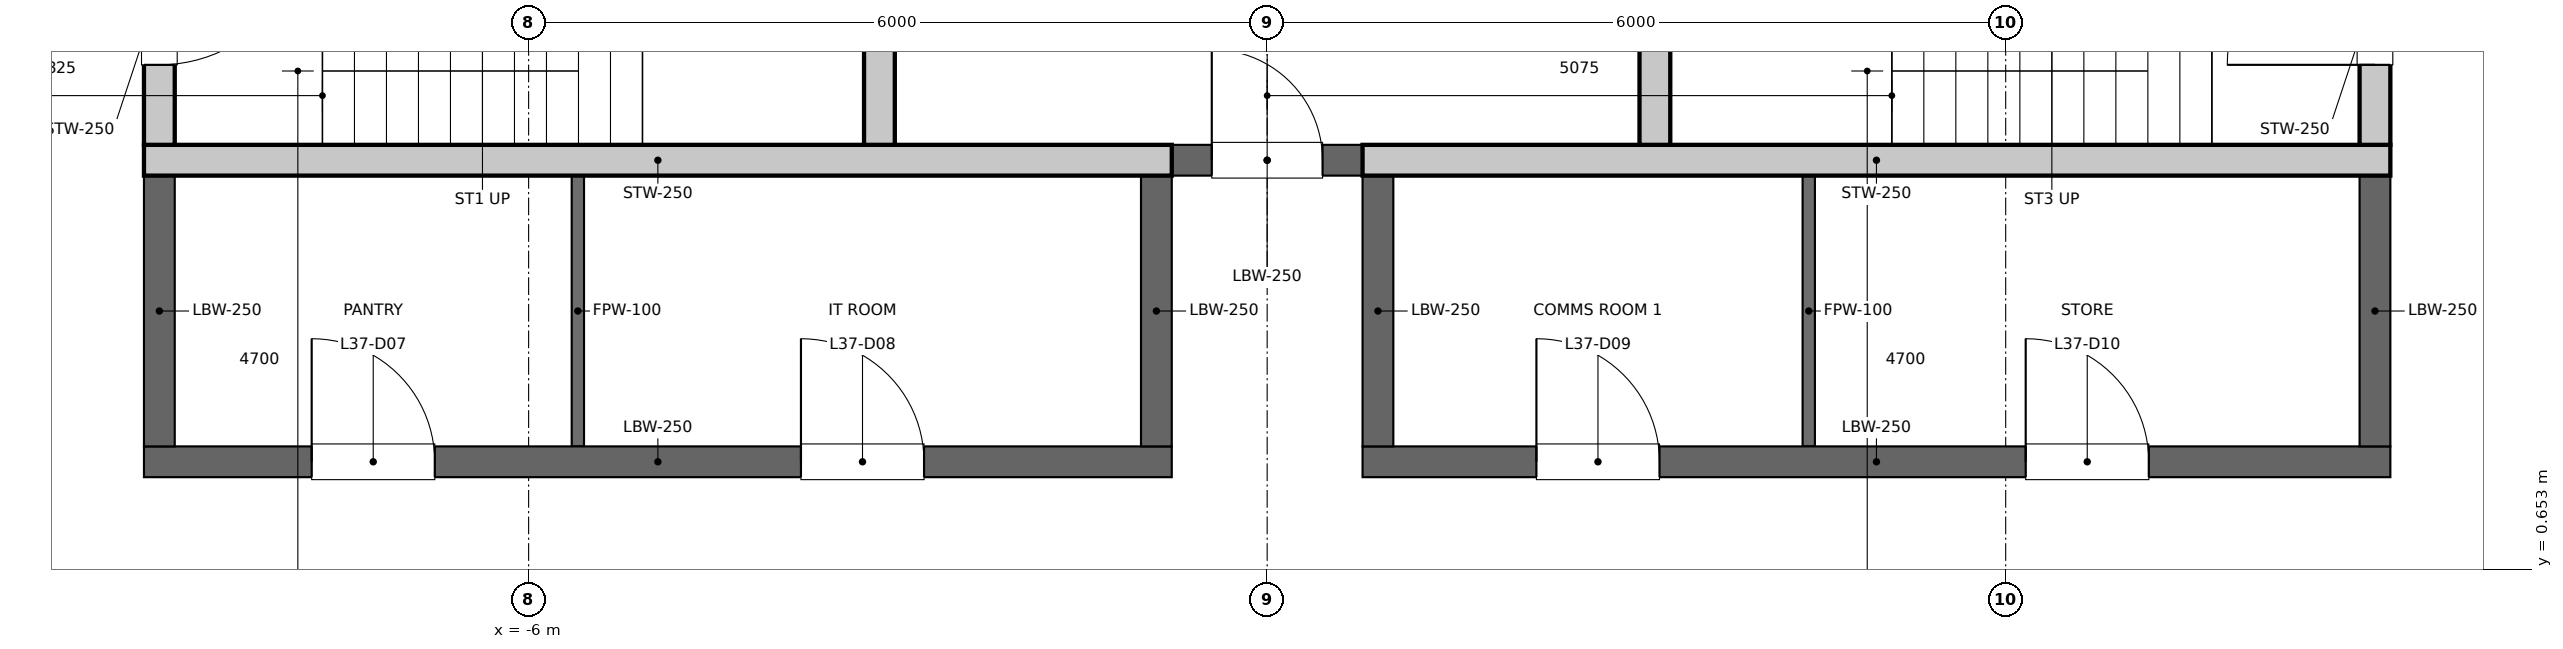
"""IFC4 building model, lengths in metres.
Left out: names, types, materials, properties, quantities, classifications, styles, units other than length and angle.
Written with IfcOpenShell. Run it as: python <this file> out.ifc"""

import sys

from ifc_helpers import new_model, si_unit, direction, frame, frame_2d, origin, place, context, subcontext, project, spatial, rectangle, extrude, element, fill, save


model = new_model("IFC4")
c1 = context("Model", 3, precision=1e-05, world=origin(), true_north=direction((0.0, 1.0)))
c2 = subcontext(c1, "Body", "Model", "MODEL_VIEW")
j1 = project(units=[si_unit("LENGTHUNIT", "METRE"), si_unit("PLANEANGLEUNIT", "RADIAN")], contexts=[c1])
p1 = place(None, origin())
s1 = spatial("IfcSite", under=j1, at=p1, CompositionType="ELEMENT")
p2 = place(p1, origin())
s2 = spatial("IfcBuilding", under=s1, at=p2, CompositionType="ELEMENT")
p3 = place(p2, frame((0.0, 0.0, 177.6)))
s3 = spatial("IfcBuildingStorey", under=s2, at=p3, CompositionType="ELEMENT", Elevation=177.6)
p4 = place(p3, frame((-9.0, 4.1, 0.0), z_axis=(0.0, 0.0, 1.0), x_axis=(0.0, 1.0, 0.0)))
e1 = element("IfcWall", 1, at=p4, inside=s3, PredefinedType="SOLIDWALL", context=c2, shape_type="SweptSolid", body=[
    extrude(rectangle(XDim=2.5, YDim=0.25, at=frame_2d((1.25, 0.0))), origin(), (0.0, 0.0, 1.0), 3.85),
])
p5 = place(p4, frame((0.65, 0.0, 0.0)))
e2 = element("IfcOpeningElement", 2, at=p5, cuts=e1, PredefinedType="OPENING", context=c2, shape_type="SweptSolid", body=[
    extrude(rectangle(XDim=1.2, YDim=2.1, at=frame_2d((0.6, 1.05))), frame((0.0, 0.125, 0.0), z_axis=(0.0, -1.0, 0.0), x_axis=(1.0, 0.0, 0.0)), (0.0, 0.0, 1.0), 0.25),
])
p6 = place(p3, frame((9.0, 4.1, 0.0), z_axis=(0.0, 0.0, 1.0), x_axis=(0.0, 1.0, 0.0)))
e3 = element("IfcWall", 3, at=p6, inside=s3, PredefinedType="SOLIDWALL", context=c2, shape_type="SweptSolid", body=[
    extrude(rectangle(XDim=2.5, YDim=0.25, at=frame_2d((1.25, 0.0))), origin(), (0.0, 0.0, 1.0), 3.85),
])
p7 = place(p6, frame((0.65, 0.0, 0.0)))
e4 = element("IfcOpeningElement", 4, at=p7, cuts=e3, PredefinedType="OPENING", context=c2, shape_type="SweptSolid", body=[
    extrude(rectangle(XDim=1.2, YDim=2.1, at=frame_2d((0.6, 1.05))), frame((0.0, 0.125, 0.0), z_axis=(0.0, -1.0, 0.0), x_axis=(1.0, 0.0, 0.0)), (0.0, 0.0, 1.0), 0.25),
])
for number, where, z_axis, x_axis in (
    (5, (-3.15, 4.1, 0.0), (0.0, 0.0, 1.0), (0.0, 1.0, 0.0)),
    (6, (3.15, 4.1, 0.0), (0.0, 0.0, 1.0), (0.0, 1.0, 0.0)),
):
    element("IfcWall", number, at=place(p3, frame(where, z_axis=z_axis, x_axis=x_axis)), inside=s3, PredefinedType="SOLIDWALL", context=c2, shape_type="SweptSolid", body=[
        extrude(rectangle(XDim=2.5, YDim=0.25, at=frame_2d((1.25, 0.0))), origin(), (0.0, 0.0, 1.0), 3.85),
    ])
p8 = place(p3, frame((-0.775, 3.975, 0.0), z_axis=(0.0, 0.0, 1.0), x_axis=(1.0, 0.0, 0.0)))
e7 = element("IfcWall", 7, at=p8, inside=s3, PredefinedType="PARTITIONING", context=c2, shape_type="SweptSolid", body=[
    extrude(rectangle(XDim=1.55, YDim=0.25, at=frame_2d((0.775, 0.0))), origin(), (0.0, 0.0, 1.0), 3.85),
])
p9 = place(p8, frame((0.325, 0.0, 0.0)))
e8 = element("IfcOpeningElement", 8, at=p9, cuts=e7, PredefinedType="OPENING", context=c2, shape_type="SweptSolid", body=[
    extrude(rectangle(XDim=0.9, YDim=2.1, at=frame_2d((0.45, 1.05))), frame((0.0, 0.125, 0.0), z_axis=(0.0, -1.0, 0.0), x_axis=(1.0, 0.0, 0.0)), (0.0, 0.0, 1.0), 0.25),
])
p10 = place(p3, frame((-9.125, 1.525, 0.0), z_axis=(0.0, 0.0, 1.0), x_axis=(1.0, 0.0, 0.0)))
e9 = element("IfcWall", 9, at=p10, inside=s3, PredefinedType="PARTITIONING", context=c2, shape_type="SweptSolid", body=[
    extrude(rectangle(XDim=8.35, YDim=0.25, at=frame_2d((4.175, 0.0))), origin(), (0.0, 0.0, 1.0), 3.85),
])
p11 = place(p10, frame((1.363, 0.0, 0.0)))
e10 = element("IfcOpeningElement", 10, at=p11, cuts=e9, PredefinedType="OPENING", context=c2, shape_type="SweptSolid", body=[
    extrude(rectangle(XDim=1.0, YDim=2.1, at=frame_2d((0.5, 1.05))), frame((0.0, 0.125, 0.0), z_axis=(0.0, -1.0, 0.0), x_axis=(1.0, 0.0, 0.0)), (0.0, 0.0, 1.0), 0.25),
])
p12 = place(p10, frame((5.337, 0.0, 0.0)))
e11 = element("IfcOpeningElement", 11, at=p12, cuts=e9, PredefinedType="OPENING", context=c2, shape_type="SweptSolid", body=[
    extrude(rectangle(XDim=1.0, YDim=2.1, at=frame_2d((0.5, 1.05))), frame((0.0, 0.125, 0.0), z_axis=(0.0, -1.0, 0.0), x_axis=(1.0, 0.0, 0.0)), (0.0, 0.0, 1.0), 0.25),
])
p13 = place(p3, frame((0.775, 1.525, 0.0), z_axis=(0.0, 0.0, 1.0), x_axis=(1.0, 0.0, 0.0)))
e12 = element("IfcWall", 12, at=p13, inside=s3, PredefinedType="PARTITIONING", context=c2, shape_type="SweptSolid", body=[
    extrude(rectangle(XDim=8.35, YDim=0.25, at=frame_2d((4.175, 0.0))), origin(), (0.0, 0.0, 1.0), 3.85),
])
p14 = place(p13, frame((1.413, 0.0, 0.0)))
e13 = element("IfcOpeningElement", 13, at=p14, cuts=e12, PredefinedType="OPENING", context=c2, shape_type="SweptSolid", body=[
    extrude(rectangle(XDim=1.0, YDim=2.1, at=frame_2d((0.5, 1.05))), frame((0.0, 0.125, 0.0), z_axis=(0.0, -1.0, 0.0), x_axis=(1.0, 0.0, 0.0)), (0.0, 0.0, 1.0), 0.25),
])
p15 = place(p13, frame((5.387, 0.0, 0.0)))
e14 = element("IfcOpeningElement", 14, at=p15, cuts=e12, PredefinedType="OPENING", context=c2, shape_type="SweptSolid", body=[
    extrude(rectangle(XDim=1.0, YDim=2.1, at=frame_2d((0.5, 1.05))), frame((0.0, 0.125, 0.0), z_axis=(0.0, -1.0, 0.0), x_axis=(1.0, 0.0, 0.0)), (0.0, 0.0, 1.0), 0.25),
])
for number, where, z_axis, x_axis in (
    (15, (-9.125, 3.975, 0.0), (0.0, 0.0, 1.0), (1.0, 0.0, 0.0)),
    (16, (0.775, 3.975, 0.0), (0.0, 0.0, 1.0), (1.0, 0.0, 0.0)),
):
    element("IfcWall", number, at=place(p3, frame(where, z_axis=z_axis, x_axis=x_axis)), inside=s3, PredefinedType="SOLIDWALL", context=c2, shape_type="SweptSolid", body=[
        extrude(rectangle(XDim=8.35, YDim=0.25, at=frame_2d((4.175, 0.0))), origin(), (0.0, 0.0, 1.0), 3.85),
    ])
for number, where, z_axis, x_axis in (
    (17, (-9.0, 1.65, 0.0), (0.0, 0.0, 1.0), (0.0, 1.0, 0.0)),
    (18, (-0.9, 1.65, 0.0), (0.0, 0.0, 1.0), (0.0, 1.0, 0.0)),
    (19, (9.0, 1.65, 0.0), (0.0, 0.0, 1.0), (0.0, 1.0, 0.0)),
    (20, (0.9, 1.65, 0.0), (0.0, 0.0, 1.0), (0.0, 1.0, 0.0)),
):
    element("IfcWall", number, at=place(p3, frame(where, z_axis=z_axis, x_axis=x_axis)), inside=s3, PredefinedType="PARTITIONING", context=c2, shape_type="SweptSolid", body=[
        extrude(rectangle(XDim=2.2, YDim=0.25, at=frame_2d((1.1, 0.0))), origin(), (0.0, 0.0, 1.0), 3.85),
    ])
for number, where, z_axis, x_axis in (
    (21, (-5.6, 1.65, 0.0), (0.0, 0.0, 1.0), (0.0, 1.0, 0.0)),
    (22, (4.4, 1.65, 0.0), (0.0, 0.0, 1.0), (0.0, 1.0, 0.0)),
):
    element("IfcWall", number, at=place(p3, frame(where, z_axis=z_axis, x_axis=x_axis)), inside=s3, PredefinedType="PARTITIONING", context=c2, shape_type="SweptSolid", body=[
        extrude(rectangle(XDim=2.2, YDim=0.1, at=frame_2d((1.1, 0.0))), origin(), (0.0, 0.0, 1.0), 3.85),
    ])
p16 = place(p5, origin())
e23 = element("IfcDoor", 23, at=p16, inside=s3, OperationType="SINGLE_SWING_RIGHT", PredefinedType="DOOR", context=c2, shape_type="SweptSolid", body=[
    extrude(rectangle(XDim=1.2, YDim=2.1, at=frame_2d((0.6, 1.05))), frame((0.0, 0.025, 0.0), z_axis=(0.0, -1.0, 0.0), x_axis=(1.0, 0.0, 0.0)), (0.0, 0.0, 1.0), 0.05),
])
fill(e2, e23)
p17 = place(p7, origin())
e24 = element("IfcDoor", 24, at=p17, inside=s3, OperationType="SINGLE_SWING_LEFT", PredefinedType="DOOR", context=c2, shape_type="SweptSolid", body=[
    extrude(rectangle(XDim=1.2, YDim=2.1, at=frame_2d((0.6, 1.05))), frame((0.0, 0.025, 0.0), z_axis=(0.0, -1.0, 0.0), x_axis=(1.0, 0.0, 0.0)), (0.0, 0.0, 1.0), 0.05),
])
fill(e4, e24)
p18 = place(p9, origin())
e25 = element("IfcDoor", 25, at=p18, inside=s3, OperationType="SINGLE_SWING_LEFT", PredefinedType="DOOR", context=c2, shape_type="SweptSolid", body=[
    extrude(rectangle(XDim=0.9, YDim=2.1, at=frame_2d((0.45, 1.05))), frame((0.0, 0.025, 0.0), z_axis=(0.0, -1.0, 0.0), x_axis=(1.0, 0.0, 0.0)), (0.0, 0.0, 1.0), 0.05),
])
fill(e8, e25)
p19 = place(p11, origin())
e26 = element("IfcDoor", 26, at=p19, inside=s3, OperationType="SINGLE_SWING_LEFT", PredefinedType="DOOR", context=c2, shape_type="SweptSolid", body=[
    extrude(rectangle(XDim=1.0, YDim=2.1, at=frame_2d((0.5, 1.05))), frame((0.0, 0.025, 0.0), z_axis=(0.0, -1.0, 0.0), x_axis=(1.0, 0.0, 0.0)), (0.0, 0.0, 1.0), 0.05),
])
fill(e10, e26)
p20 = place(p12, origin())
e27 = element("IfcDoor", 27, at=p20, inside=s3, OperationType="SINGLE_SWING_LEFT", PredefinedType="DOOR", context=c2, shape_type="SweptSolid", body=[
    extrude(rectangle(XDim=1.0, YDim=2.1, at=frame_2d((0.5, 1.05))), frame((0.0, 0.025, 0.0), z_axis=(0.0, -1.0, 0.0), x_axis=(1.0, 0.0, 0.0)), (0.0, 0.0, 1.0), 0.05),
])
fill(e11, e27)
p21 = place(p14, origin())
e28 = element("IfcDoor", 28, at=p21, inside=s3, OperationType="SINGLE_SWING_LEFT", PredefinedType="DOOR", context=c2, shape_type="SweptSolid", body=[
    extrude(rectangle(XDim=1.0, YDim=2.1, at=frame_2d((0.5, 1.05))), frame((0.0, 0.025, 0.0), z_axis=(0.0, -1.0, 0.0), x_axis=(1.0, 0.0, 0.0)), (0.0, 0.0, 1.0), 0.05),
])
fill(e13, e28)
p22 = place(p15, origin())
e29 = element("IfcDoor", 29, at=p22, inside=s3, OperationType="SINGLE_SWING_LEFT", PredefinedType="DOOR", context=c2, shape_type="SweptSolid", body=[
    extrude(rectangle(XDim=1.0, YDim=2.1, at=frame_2d((0.5, 1.05))), frame((0.0, 0.025, 0.0), z_axis=(0.0, -1.0, 0.0), x_axis=(1.0, 0.0, 0.0)), (0.0, 0.0, 1.0), 0.05),
])
fill(e14, e29)
save(model, sys.argv[1])
